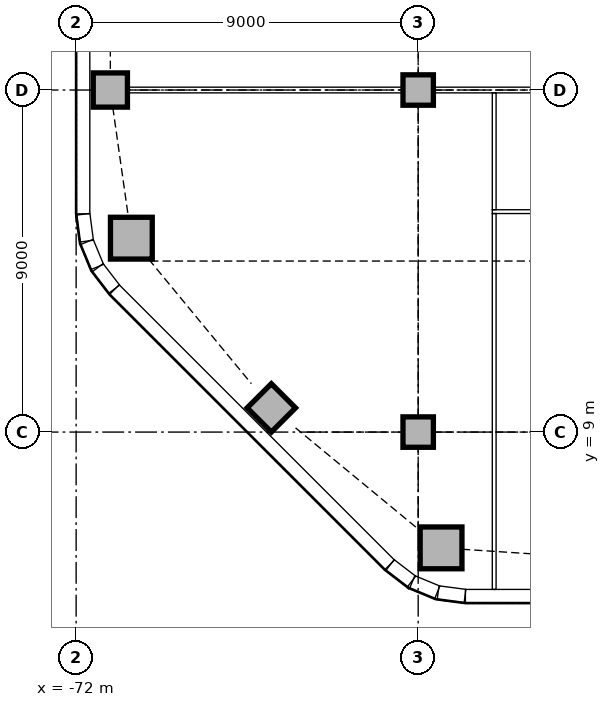
"""IFC4 building model, lengths in metres.
Left out: names, types, materials, properties, quantities, classifications, styles, units other than length and angle.
Written with IfcOpenShell. Run it as: python <this file> out.ifc"""

import sys

from ifc_helpers import new_model, si_unit, direction, frame, frame_2d, origin, origin_2d, place, context, subcontext, project, spatial, rectangle, extrude, element, fill, save


model = new_model("IFC4")
c1 = context("Model", 3, precision=1e-05, world=origin(), true_north=direction((0.0, 1.0)))
c2 = subcontext(c1, "Body", "Model", "MODEL_VIEW")
j1 = project(units=[si_unit("LENGTHUNIT", "METRE"), si_unit("PLANEANGLEUNIT", "RADIAN")], contexts=[c1])
p1 = place(None, origin())
s1 = spatial("IfcSite", under=j1, at=p1, CompositionType="ELEMENT")
p2 = place(p1, origin())
s2 = spatial("IfcBuilding", under=s1, at=p2, CompositionType="ELEMENT")
p3 = place(p2, frame((0.0, 0.0, 26.0)))
s3 = spatial("IfcBuildingStorey", under=s2, at=p3, CompositionType="ELEMENT", Elevation=26.0)
for number, where, z_axis, x_axis in (
    (1, (-62.398, 5.953, 0.0), (0.0, 0.0, 1.0), (1.0, 0.0, 0.0)),
    (2, (-70.547, 14.102, 0.0), (0.0, 0.0, 1.0), (1.0, 0.0, 0.0)),
):
    element("IfcColumn", number, at=place(p3, frame(where, z_axis=z_axis, x_axis=x_axis)), inside=s3, PredefinedType="COLUMN", context=c2, shape_type="SweptSolid", body=[
        extrude(rectangle(XDim=1.1, YDim=1.1, at=origin_2d()), origin(), (0.0, 0.0, 1.0), 3.85),
    ])
for number, where, z_axis, x_axis in (
    (3, (-71.1, 18.0, 0.0), (0.0, 0.0, 1.0), (1.0, 0.0, 0.0)),
    (4, (-66.864, 9.636, 0.0), (0.0, 0.0, 1.0), (0.707, 0.707, 0.0)),
):
    element("IfcColumn", number, at=place(p3, frame(where, z_axis=z_axis, x_axis=x_axis)), inside=s3, PredefinedType="COLUMN", context=c2, shape_type="SweptSolid", body=[
        extrude(rectangle(XDim=0.9, YDim=0.9, at=origin_2d()), origin(), (0.0, 0.0, 1.0), 3.85),
    ])
for number, where, z_axis, x_axis in (
    (5, (-63.0, 9.0, 0.0), (0.0, 0.0, 1.0), (1.0, 0.0, 0.0)),
    (6, (-63.0, 18.0, 0.0), (0.0, 0.0, 1.0), (1.0, 0.0, 0.0)),
):
    element("IfcColumn", number, at=place(p3, frame(where, z_axis=z_axis, x_axis=x_axis)), inside=s3, PredefinedType="COLUMN", context=c2, shape_type="SweptSolid", body=[
        extrude(rectangle(XDim=0.8, YDim=0.8, at=origin_2d()), origin(), (0.0, 0.0, 1.0), 3.85),
    ])
p4 = place(p3, frame((-61.757, 4.68, 0.0), z_axis=(0.0, 0.0, 1.0), x_axis=(1.0, 0.0, 0.0)))
e7 = element("IfcWall", 7, at=p4, inside=s3, PredefinedType="STANDARD", context=c2, shape_type="SweptSolid", body=[
    extrude(rectangle(XDim=30.515, YDim=0.36, at=frame_2d((15.257, 0.0))), origin(), (0.0, 0.0, 1.0), 3.85),
])
p5 = place(p4, frame((2.357, 0.0, 0.9)))
e8 = element("IfcOpeningElement", 8, at=p5, cuts=e7, PredefinedType="OPENING", context=c2, shape_type="SweptSolid", body=[
    extrude(rectangle(XDim=3.3, YDim=1.6, at=frame_2d((1.65, 0.8))), frame((0.0, 0.19, 0.0), z_axis=(0.0, -1.0, 0.0), x_axis=(1.0, 0.0, 0.0)), (0.0, 0.0, 1.0), 0.38),
])
p6 = place(p4, frame((6.857, 0.0, 0.9)))
e9 = element("IfcOpeningElement", 9, at=p6, cuts=e7, PredefinedType="OPENING", context=c2, shape_type="SweptSolid", body=[
    extrude(rectangle(XDim=3.3, YDim=1.6, at=frame_2d((1.65, 0.8))), frame((0.0, 0.19, 0.0), z_axis=(0.0, -1.0, 0.0), x_axis=(1.0, 0.0, 0.0)), (0.0, 0.0, 1.0), 0.38),
])
p7 = place(p4, frame((11.357, 0.0, 0.9)))
e10 = element("IfcOpeningElement", 10, at=p7, cuts=e7, PredefinedType="OPENING", context=c2, shape_type="SweptSolid", body=[
    extrude(rectangle(XDim=3.3, YDim=1.6, at=frame_2d((1.65, 0.8))), frame((0.0, 0.19, 0.0), z_axis=(0.0, -1.0, 0.0), x_axis=(1.0, 0.0, 0.0)), (0.0, 0.0, 1.0), 0.38),
])
p8 = place(p4, frame((15.857, 0.0, 0.9)))
e11 = element("IfcOpeningElement", 11, at=p8, cuts=e7, PredefinedType="OPENING", context=c2, shape_type="SweptSolid", body=[
    extrude(rectangle(XDim=3.3, YDim=1.6, at=frame_2d((1.65, 0.8))), frame((0.0, 0.19, 0.0), z_axis=(0.0, -1.0, 0.0), x_axis=(1.0, 0.0, 0.0)), (0.0, 0.0, 1.0), 0.38),
])
p9 = place(p4, frame((20.357, 0.0, 0.9)))
e12 = element("IfcOpeningElement", 12, at=p9, cuts=e7, PredefinedType="OPENING", context=c2, shape_type="SweptSolid", body=[
    extrude(rectangle(XDim=3.3, YDim=1.6, at=frame_2d((1.65, 0.8))), frame((0.0, 0.19, 0.0), z_axis=(0.0, -1.0, 0.0), x_axis=(1.0, 0.0, 0.0)), (0.0, 0.0, 1.0), 0.38),
])
p10 = place(p4, frame((24.857, 0.0, 0.9)))
e13 = element("IfcOpeningElement", 13, at=p10, cuts=e7, PredefinedType="OPENING", context=c2, shape_type="SweptSolid", body=[
    extrude(rectangle(XDim=3.3, YDim=1.6, at=frame_2d((1.65, 0.8))), frame((0.0, 0.19, 0.0), z_axis=(0.0, -1.0, 0.0), x_axis=(1.0, 0.0, 0.0)), (0.0, 0.0, 1.0), 0.38),
])
p11 = place(p3, frame((-71.82, 40.757, 0.0), z_axis=(0.0, 0.0, 1.0), x_axis=(0.0, -1.0, 0.0)))
e14 = element("IfcWall", 14, at=p11, inside=s3, PredefinedType="STANDARD", context=c2, shape_type="SweptSolid", body=[
    extrude(rectangle(XDim=26.015, YDim=0.36, at=frame_2d((13.007, 0.0))), origin(), (0.0, 0.0, 1.0), 3.85),
])
p12 = place(p11, frame((2.357, 0.0, 0.9)))
e15 = element("IfcOpeningElement", 15, at=p12, cuts=e14, PredefinedType="OPENING", context=c2, shape_type="SweptSolid", body=[
    extrude(rectangle(XDim=3.3, YDim=1.6, at=frame_2d((1.65, 0.8))), frame((0.0, 0.19, 0.0), z_axis=(0.0, -1.0, 0.0), x_axis=(1.0, 0.0, 0.0)), (0.0, 0.0, 1.0), 0.38),
])
p13 = place(p11, frame((7.057, 0.0, 0.9)))
e16 = element("IfcOpeningElement", 16, at=p13, cuts=e14, PredefinedType="OPENING", context=c2, shape_type="SweptSolid", body=[
    extrude(rectangle(XDim=3.3, YDim=1.6, at=frame_2d((1.65, 0.8))), frame((0.0, 0.19, 0.0), z_axis=(0.0, -1.0, 0.0), x_axis=(1.0, 0.0, 0.0)), (0.0, 0.0, 1.0), 0.38),
])
p14 = place(p11, frame((11.357, 0.0, 0.9)))
e17 = element("IfcOpeningElement", 17, at=p14, cuts=e14, PredefinedType="OPENING", context=c2, shape_type="SweptSolid", body=[
    extrude(rectangle(XDim=3.3, YDim=1.6, at=frame_2d((1.65, 0.8))), frame((0.0, 0.19, 0.0), z_axis=(0.0, -1.0, 0.0), x_axis=(1.0, 0.0, 0.0)), (0.0, 0.0, 1.0), 0.38),
])
p15 = place(p11, frame((15.857, 0.0, 0.9)))
e18 = element("IfcOpeningElement", 18, at=p15, cuts=e14, PredefinedType="OPENING", context=c2, shape_type="SweptSolid", body=[
    extrude(rectangle(XDim=3.3, YDim=1.6, at=frame_2d((1.65, 0.8))), frame((0.0, 0.19, 0.0), z_axis=(0.0, -1.0, 0.0), x_axis=(1.0, 0.0, 0.0)), (0.0, 0.0, 1.0), 0.38),
])
p16 = place(p11, frame((20.957, 0.0, 0.9)))
e19 = element("IfcOpeningElement", 19, at=p16, cuts=e14, PredefinedType="OPENING", context=c2, shape_type="SweptSolid", body=[
    extrude(rectangle(XDim=3.3, YDim=1.6, at=frame_2d((1.65, 0.8))), frame((0.0, 0.19, 0.0), z_axis=(0.0, -1.0, 0.0), x_axis=(1.0, 0.0, 0.0)), (0.0, 0.0, 1.0), 0.38),
])
p17 = place(p3, frame((-70.994, 12.749, 0.0), z_axis=(0.0, 0.0, 1.0), x_axis=(0.707106781187, -0.707106781187, 0.0)))
e20 = element("IfcWall", 20, at=p17, inside=s3, PredefinedType="STANDARD", context=c2, shape_type="SweptSolid", body=[
    extrude(rectangle(XDim=10.243, YDim=0.36, at=frame_2d((5.121, 0.0))), origin(), (0.0, 0.0, 1.0), 3.85),
])
p18 = place(p17, frame((3.471, 0.0, 0.9)))
e21 = element("IfcOpeningElement", 21, at=p18, cuts=e20, PredefinedType="OPENING", context=c2, shape_type="SweptSolid", body=[
    extrude(rectangle(XDim=3.3, YDim=1.6, at=frame_2d((1.65, 0.8))), frame((0.0, 0.19, 0.0), z_axis=(0.0, -1.0, 0.0), x_axis=(1.0, 0.0, 0.0)), (0.0, 0.0, 1.0), 0.38),
])
for number, where, z_axis, x_axis in (
    (22, (-71.817, 14.731, 0.0), (0.0, 0.0, 1.0), (0.131, -0.991, 0.0)),
    (23, (-71.718, 14.003, 0.0), (0.0, 0.0, 1.0), (0.383, -0.924, 0.0)),
):
    element("IfcWall", number, at=place(p3, frame(where, z_axis=z_axis, x_axis=x_axis)), inside=s3, PredefinedType="STANDARD", context=c2, shape_type="SweptSolid", body=[
        extrude(rectangle(XDim=0.713, YDim=0.36, at=frame_2d((0.356, 0.0))), origin(), (0.0, 0.0, 1.0), 3.85),
    ])
for number, where, z_axis, x_axis in (
    (24, (-71.434, 13.325, 0.0), (0.0, 0.0, 1.0), (0.609, -0.793, 0.0)),
    (25, (-63.741, 5.5, 0.0), (0.0, 0.0, 1.0), (0.793, -0.609, 0.0)),
):
    element("IfcWall", number, at=place(p3, frame(where, z_axis=z_axis, x_axis=x_axis)), inside=s3, PredefinedType="STANDARD", context=c2, shape_type="SweptSolid", body=[
        extrude(rectangle(XDim=0.713, YDim=0.36, at=frame_2d((0.357, 0.0))), origin(), (0.0, 0.0, 1.0), 3.85),
    ])
for number, where, z_axis, x_axis in (
    (26, (-63.156, 5.055, 0.0), (0.0, 0.0, 1.0), (0.924, -0.383, 0.0)),
    (27, (-62.476, 4.776, 0.0), (0.0, 0.0, 1.0), (0.991, -0.131, 0.0)),
):
    element("IfcWall", number, at=place(p3, frame(where, z_axis=z_axis, x_axis=x_axis)), inside=s3, PredefinedType="STANDARD", context=c2, shape_type="SweptSolid", body=[
        extrude(rectangle(XDim=0.713, YDim=0.36, at=frame_2d((0.356, 0.0))), origin(), (0.0, 0.0, 1.0), 3.85),
    ])
p19 = place(p3, frame((-62.6, 18.0, 0.0), z_axis=(0.0, 0.0, 1.0), x_axis=(1.0, 0.0, 0.0)))
e28 = element("IfcWall", 28, at=p19, inside=s3, PredefinedType="PARTITIONING", context=c2, shape_type="SweptSolid", body=[
    extrude(rectangle(XDim=8.2, YDim=0.15, at=frame_2d((4.1, 0.0))), origin(), (0.0, 0.0, 1.0), 3.15),
])
p20 = place(p19, frame((0.4, 0.0, 0.0)))
e29 = element("IfcOpeningElement", 29, at=p20, cuts=e28, PredefinedType="OPENING", context=c2, shape_type="SweptSolid", body=[
    extrude(rectangle(XDim=0.9, YDim=2.1, at=frame_2d((0.45, 1.05))), frame((0.0, 0.085, 0.0), z_axis=(0.0, -1.0, 0.0), x_axis=(1.0, 0.0, 0.0)), (0.0, 0.0, 1.0), 0.17),
])
p21 = place(p19, frame((4.02, 0.0, 0.0)))
e30 = element("IfcOpeningElement", 30, at=p21, cuts=e28, PredefinedType="OPENING", context=c2, shape_type="SweptSolid", body=[
    extrude(rectangle(XDim=1.0, YDim=2.1, at=frame_2d((0.5, 1.05))), frame((0.0, 0.085, 0.0), z_axis=(0.0, -1.0, 0.0), x_axis=(1.0, 0.0, 0.0)), (0.0, 0.0, 1.0), 0.17),
])
p22 = place(p3, frame((-70.65, 18.0, 0.0), z_axis=(0.0, 0.0, 1.0), x_axis=(1.0, 0.0, 0.0)))
e31 = element("IfcWall", 31, at=p22, inside=s3, PredefinedType="PARTITIONING", context=c2, shape_type="SweptSolid", body=[
    extrude(rectangle(XDim=7.25, YDim=0.15, at=frame_2d((3.625, 0.0))), origin(), (0.0, 0.0, 1.0), 3.15),
])
p23 = place(p3, frame((-61.05, 14.8, 0.0), z_axis=(0.0, 0.0, 1.0), x_axis=(1.0, 0.0, 0.0)))
e32 = element("IfcWall", 32, at=p23, inside=s3, PredefinedType="PARTITIONING", context=c2, shape_type="SweptSolid", body=[
    extrude(rectangle(XDim=6.975, YDim=0.1, at=frame_2d((3.487, 0.0))), origin(), (0.0, 0.0, 1.0), 3.85),
])
p24 = place(p23, frame((2.52, 0.0, 0.0)))
e33 = element("IfcOpeningElement", 33, at=p24, cuts=e32, PredefinedType="OPENING", context=c2, shape_type="SweptSolid", body=[
    extrude(rectangle(XDim=0.9, YDim=2.1, at=frame_2d((0.45, 1.05))), frame((0.0, 0.06, 0.0), z_axis=(0.0, -1.0, 0.0), x_axis=(1.0, 0.0, 0.0)), (0.0, 0.0, 1.0), 0.12),
])
p25 = place(p3, frame((-61.0, 14.85, 0.0), z_axis=(0.0, 0.0, 1.0), x_axis=(0.0, 1.0, 0.0)))
e34 = element("IfcWall", 34, at=p25, inside=s3, PredefinedType="PARTITIONING", context=c2, shape_type="SweptSolid", body=[
    extrude(rectangle(XDim=3.075, YDim=0.1, at=frame_2d((1.538, 0.0))), origin(), (0.0, 0.0, 1.0), 3.85),
])
p26 = place(p3, frame((-61.0, 4.86, 0.0), z_axis=(0.0, 0.0, 1.0), x_axis=(0.0, 1.0, 0.0)))
e35 = element("IfcWall", 35, at=p26, inside=s3, PredefinedType="PARTITIONING", context=c2, shape_type="SweptSolid", body=[
    extrude(rectangle(XDim=9.89, YDim=0.1, at=frame_2d((4.945, 0.0))), origin(), (0.0, 0.0, 1.0), 3.85),
])
p27 = place(p16, origin())
e36 = element("IfcWindow", 36, at=p27, inside=s3, PartitioningType="SINGLE_PANEL", PredefinedType="WINDOW", context=c2, shape_type="SweptSolid", body=[
    extrude(rectangle(XDim=3.3, YDim=1.6, at=frame_2d((1.65, 0.8))), frame((0.0, 0.13, 0.0), z_axis=(0.0, -1.0, 0.0), x_axis=(1.0, 0.0, 0.0)), (0.0, 0.0, 1.0), 0.06),
])
fill(e19, e36)
p28 = place(p18, origin())
e37 = element("IfcWindow", 37, at=p28, inside=s3, PartitioningType="SINGLE_PANEL", PredefinedType="WINDOW", context=c2, shape_type="SweptSolid", body=[
    extrude(rectangle(XDim=3.3, YDim=1.6, at=frame_2d((1.65, 0.8))), frame((0.0, 0.13, 0.0), z_axis=(0.0, -1.0, 0.0), x_axis=(1.0, 0.0, 0.0)), (0.0, 0.0, 1.0), 0.06),
])
fill(e21, e37)
p29 = place(p20, frame((0.9, 0.0, 0.0), z_axis=(0.0, 0.0, 1.0), x_axis=(-1.0, 0.0, 0.0)))
e38 = element("IfcDoor", 38, at=p29, inside=s3, OperationType="SINGLE_SWING_LEFT", PredefinedType="DOOR", context=c2, shape_type="SweptSolid", body=[
    extrude(rectangle(XDim=0.9, YDim=2.1, at=frame_2d((0.45, 1.05))), frame((0.0, 0.025, 0.0), z_axis=(0.0, -1.0, 0.0), x_axis=(1.0, 0.0, 0.0)), (0.0, 0.0, 1.0), 0.05),
])
fill(e29, e38)
save(model, sys.argv[1])
